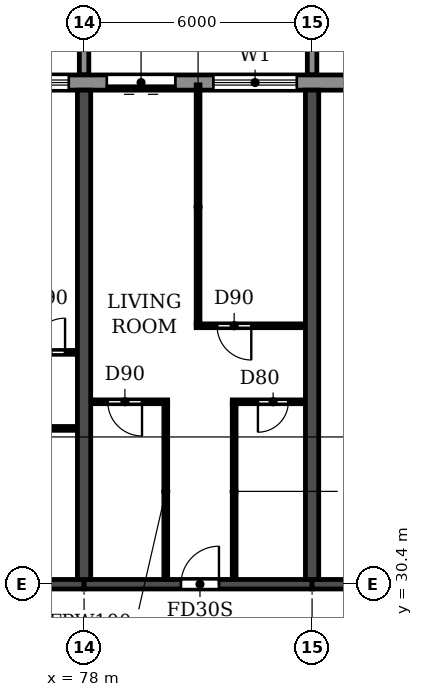
"""IFC4 building model, lengths in metres.
Left out: names, types, materials, properties, quantities, classifications, styles, units other than length and angle.
Written with IfcOpenShell. Run it as: python <this file> out.ifc"""

import sys

from ifc_helpers import new_model, si_unit, direction, frame, frame_2d, origin, place, context, subcontext, project, spatial, polyline, rectangle, outline, extrude, source, transform, mapped, element, fill, save


model = new_model("IFC4")
c1 = context("Model", 3, precision=1e-05, world=origin(), true_north=direction((0.0, 1.0)))
c2 = subcontext(c1, "Body", "Model", "MODEL_VIEW")
j1 = project(units=[si_unit("LENGTHUNIT", "METRE"), si_unit("PLANEANGLEUNIT", "RADIAN")], contexts=[c1])
p1 = place(None, origin())
s1 = spatial("IfcSite", under=j1, at=p1, CompositionType="ELEMENT")
p2 = place(p1, origin())
s2 = spatial("IfcBuilding", under=s1, at=p2, CompositionType="ELEMENT")
p3 = place(p2, frame((0.0, 0.0, 112.5)))
s3 = spatial("IfcBuildingStorey", under=s2, at=p3, CompositionType="ELEMENT", Elevation=112.5)
for number, where, z_axis, x_axis in (
    (1, (78.0, 30.525, 0.0), (0.0, 0.0, 1.0), (0.0, 1.0, 0.0)),
    (2, (84.0, 30.525, 0.0), (0.0, 0.0, 1.0), (0.0, 1.0, 0.0)),
):
    element("IfcWall", number, at=place(p3, frame(where, z_axis=z_axis, x_axis=x_axis)), inside=s3, PredefinedType="SHEAR", context=c2, shape_type="SweptSolid", body=[
        extrude(rectangle(XDim=12.875, YDim=0.35, at=frame_2d((6.438, 0.0))), origin(), (0.0, 0.0, 1.0), 2.95),
    ])
p4 = place(p3, frame((72.0, 30.4, 0.0), z_axis=(0.0, 0.0, 1.0), x_axis=(1.0, 0.0, 0.0)))
e3 = element("IfcWall", 3, at=p4, inside=s3, PredefinedType="SHEAR", context=c2, shape_type="SweptSolid", body=[
    extrude(rectangle(XDim=6.0, YDim=0.25, at=frame_2d((3.0, 0.0))), origin(), (0.0, 0.0, 1.0), 2.35),
])
p5 = place(p3, frame((78.0, 30.4, 0.0), z_axis=(0.0, 0.0, 1.0), x_axis=(1.0, 0.0, 0.0)))
e4 = element("IfcWall", 4, at=p5, inside=s3, PredefinedType="SHEAR", context=c2, shape_type="SweptSolid", body=[
    extrude(rectangle(XDim=6.0, YDim=0.25, at=frame_2d((3.0, 0.0))), origin(), (0.0, 0.0, 1.0), 2.35),
])
p6 = place(p5, frame((2.55, 0.0, 0.0)))
e5 = element("IfcOpeningElement", 5, at=p6, cuts=e4, PredefinedType="OPENING", context=c2, shape_type="SweptSolid", body=[
    extrude(rectangle(XDim=1.0, YDim=2.1, at=frame_2d((0.5, 1.05))), frame((0.0, 0.135, 0.0), z_axis=(0.0, -1.0, 0.0), x_axis=(1.0, 0.0, 0.0)), (0.0, 0.0, 1.0), 0.27),
])
p7 = place(p3, frame((84.0, 30.4, 0.0), z_axis=(0.0, 0.0, 1.0), x_axis=(1.0, 0.0, 0.0)))
e6 = element("IfcWall", 6, at=p7, inside=s3, PredefinedType="SHEAR", context=c2, shape_type="SweptSolid", body=[
    extrude(rectangle(XDim=5.8, YDim=0.25, at=frame_2d((2.9, 0.0))), origin(), (0.0, 0.0, 1.0), 2.35),
])
p8 = place(p7, frame((2.5, 0.0, 0.0)))
e7 = element("IfcOpeningElement", 7, at=p8, cuts=e6, PredefinedType="OPENING", context=c2, shape_type="SweptSolid", body=[
    extrude(rectangle(XDim=1.0, YDim=2.1, at=frame_2d((0.5, 1.05))), frame((0.0, 0.135, 0.0), z_axis=(0.0, -1.0, 0.0), x_axis=(1.0, 0.0, 0.0)), (0.0, 0.0, 1.0), 0.27),
])
p9 = place(p3, frame((85.317, 43.6, 0.0), z_axis=(0.0, 0.0, 1.0), x_axis=(-1.0, 0.0, 0.0)))
e8 = element("IfcWall", 8, at=p9, inside=s3, PredefinedType="STANDARD", context=c2, shape_type="SweptSolid", body=[
    extrude(rectangle(XDim=68.634, YDim=0.4, at=frame_2d((34.317, 0.0))), origin(), (0.0, 0.0, 1.0), 2.95),
])
p10 = place(p9, frame((64.917, 0.0, 0.0)))
e9 = element("IfcOpeningElement", 9, at=p10, cuts=e8, PredefinedType="OPENING", context=c2, shape_type="SweptSolid", body=[
    extrude(rectangle(XDim=1.8, YDim=2.4, at=frame_2d((0.9, 1.2))), frame((0.0, 0.21, 0.0), z_axis=(0.0, -1.0, 0.0), x_axis=(1.0, 0.0, 0.0)), (0.0, 0.0, 1.0), 0.42),
])
p11 = place(p9, frame((61.717, 0.0, 0.9)))
e10 = element("IfcOpeningElement", 10, at=p11, cuts=e8, PredefinedType="OPENING", context=c2, shape_type="SweptSolid", body=[
    extrude(rectangle(XDim=2.2, YDim=1.5, at=frame_2d((1.1, 0.75))), frame((0.0, 0.21, 0.0), z_axis=(0.0, -1.0, 0.0), x_axis=(1.0, 0.0, 0.0)), (0.0, 0.0, 1.0), 0.42),
])
p12 = place(p9, frame((58.717, 0.0, 0.9)))
e11 = element("IfcOpeningElement", 11, at=p12, cuts=e8, PredefinedType="OPENING", context=c2, shape_type="SweptSolid", body=[
    extrude(rectangle(XDim=2.2, YDim=1.5, at=frame_2d((1.1, 0.75))), frame((0.0, 0.21, 0.0), z_axis=(0.0, -1.0, 0.0), x_axis=(1.0, 0.0, 0.0)), (0.0, 0.0, 1.0), 0.42),
])
p13 = place(p9, frame((55.917, 0.0, 0.0)))
e12 = element("IfcOpeningElement", 12, at=p13, cuts=e8, PredefinedType="OPENING", context=c2, shape_type="SweptSolid", body=[
    extrude(rectangle(XDim=1.8, YDim=2.4, at=frame_2d((0.9, 1.2))), frame((0.0, 0.21, 0.0), z_axis=(0.0, -1.0, 0.0), x_axis=(1.0, 0.0, 0.0)), (0.0, 0.0, 1.0), 0.42),
])
p14 = place(p9, frame((52.917, 0.0, 0.0)))
e13 = element("IfcOpeningElement", 13, at=p14, cuts=e8, PredefinedType="OPENING", context=c2, shape_type="SweptSolid", body=[
    extrude(rectangle(XDim=1.8, YDim=2.4, at=frame_2d((0.9, 1.2))), frame((0.0, 0.21, 0.0), z_axis=(0.0, -1.0, 0.0), x_axis=(1.0, 0.0, 0.0)), (0.0, 0.0, 1.0), 0.42),
])
p15 = place(p9, frame((49.717, 0.0, 0.9)))
e14 = element("IfcOpeningElement", 14, at=p15, cuts=e8, PredefinedType="OPENING", context=c2, shape_type="SweptSolid", body=[
    extrude(rectangle(XDim=2.2, YDim=1.5, at=frame_2d((1.1, 0.75))), frame((0.0, 0.21, 0.0), z_axis=(0.0, -1.0, 0.0), x_axis=(1.0, 0.0, 0.0)), (0.0, 0.0, 1.0), 0.42),
])
p16 = place(p9, frame((46.717, 0.0, 0.9)))
e15 = element("IfcOpeningElement", 15, at=p16, cuts=e8, PredefinedType="OPENING", context=c2, shape_type="SweptSolid", body=[
    extrude(rectangle(XDim=2.2, YDim=1.5, at=frame_2d((1.1, 0.75))), frame((0.0, 0.21, 0.0), z_axis=(0.0, -1.0, 0.0), x_axis=(1.0, 0.0, 0.0)), (0.0, 0.0, 1.0), 0.42),
])
p17 = place(p9, frame((43.917, 0.0, 0.0)))
e16 = element("IfcOpeningElement", 16, at=p17, cuts=e8, PredefinedType="OPENING", context=c2, shape_type="SweptSolid", body=[
    extrude(rectangle(XDim=1.8, YDim=2.4, at=frame_2d((0.9, 1.2))), frame((0.0, 0.21, 0.0), z_axis=(0.0, -1.0, 0.0), x_axis=(1.0, 0.0, 0.0)), (0.0, 0.0, 1.0), 0.42),
])
p18 = place(p9, frame((40.717, 0.0, 0.9)))
e17 = element("IfcOpeningElement", 17, at=p18, cuts=e8, PredefinedType="OPENING", context=c2, shape_type="SweptSolid", body=[
    extrude(rectangle(XDim=2.2, YDim=1.5, at=frame_2d((1.1, 0.75))), frame((0.0, 0.21, 0.0), z_axis=(0.0, -1.0, 0.0), x_axis=(1.0, 0.0, 0.0)), (0.0, 0.0, 1.0), 0.42),
])
p19 = place(p9, frame((37.717, 0.0, 0.9)))
e18 = element("IfcOpeningElement", 18, at=p19, cuts=e8, PredefinedType="OPENING", context=c2, shape_type="SweptSolid", body=[
    extrude(rectangle(XDim=2.2, YDim=1.5, at=frame_2d((1.1, 0.75))), frame((0.0, 0.21, 0.0), z_axis=(0.0, -1.0, 0.0), x_axis=(1.0, 0.0, 0.0)), (0.0, 0.0, 1.0), 0.42),
])
p20 = place(p9, frame((34.917, 0.0, 0.0)))
e19 = element("IfcOpeningElement", 19, at=p20, cuts=e8, PredefinedType="OPENING", context=c2, shape_type="SweptSolid", body=[
    extrude(rectangle(XDim=1.8, YDim=2.4, at=frame_2d((0.9, 1.2))), frame((0.0, 0.21, 0.0), z_axis=(0.0, -1.0, 0.0), x_axis=(1.0, 0.0, 0.0)), (0.0, 0.0, 1.0), 0.42),
])
p21 = place(p9, frame((31.717, 0.0, 0.9)))
e20 = element("IfcOpeningElement", 20, at=p21, cuts=e8, PredefinedType="OPENING", context=c2, shape_type="SweptSolid", body=[
    extrude(rectangle(XDim=2.2, YDim=1.5, at=frame_2d((1.1, 0.75))), frame((0.0, 0.21, 0.0), z_axis=(0.0, -1.0, 0.0), x_axis=(1.0, 0.0, 0.0)), (0.0, 0.0, 1.0), 0.42),
])
p22 = place(p9, frame((28.917, 0.0, 0.0)))
e21 = element("IfcOpeningElement", 21, at=p22, cuts=e8, PredefinedType="OPENING", context=c2, shape_type="SweptSolid", body=[
    extrude(rectangle(XDim=1.8, YDim=2.4, at=frame_2d((0.9, 1.2))), frame((0.0, 0.21, 0.0), z_axis=(0.0, -1.0, 0.0), x_axis=(1.0, 0.0, 0.0)), (0.0, 0.0, 1.0), 0.42),
])
p23 = place(p9, frame((25.717, 0.0, 0.9)))
e22 = element("IfcOpeningElement", 22, at=p23, cuts=e8, PredefinedType="OPENING", context=c2, shape_type="SweptSolid", body=[
    extrude(rectangle(XDim=2.2, YDim=1.5, at=frame_2d((1.1, 0.75))), frame((0.0, 0.21, 0.0), z_axis=(0.0, -1.0, 0.0), x_axis=(1.0, 0.0, 0.0)), (0.0, 0.0, 1.0), 0.42),
])
p24 = place(p9, frame((22.717, 0.0, 0.9)))
e23 = element("IfcOpeningElement", 23, at=p24, cuts=e8, PredefinedType="OPENING", context=c2, shape_type="SweptSolid", body=[
    extrude(rectangle(XDim=2.2, YDim=1.5, at=frame_2d((1.1, 0.75))), frame((0.0, 0.21, 0.0), z_axis=(0.0, -1.0, 0.0), x_axis=(1.0, 0.0, 0.0)), (0.0, 0.0, 1.0), 0.42),
])
p25 = place(p9, frame((19.917, 0.0, 0.0)))
e24 = element("IfcOpeningElement", 24, at=p25, cuts=e8, PredefinedType="OPENING", context=c2, shape_type="SweptSolid", body=[
    extrude(rectangle(XDim=1.8, YDim=2.4, at=frame_2d((0.9, 1.2))), frame((0.0, 0.21, 0.0), z_axis=(0.0, -1.0, 0.0), x_axis=(1.0, 0.0, 0.0)), (0.0, 0.0, 1.0), 0.42),
])
p26 = place(p9, frame((16.717, 0.0, 0.9)))
e25 = element("IfcOpeningElement", 25, at=p26, cuts=e8, PredefinedType="OPENING", context=c2, shape_type="SweptSolid", body=[
    extrude(rectangle(XDim=2.2, YDim=1.5, at=frame_2d((1.1, 0.75))), frame((0.0, 0.21, 0.0), z_axis=(0.0, -1.0, 0.0), x_axis=(1.0, 0.0, 0.0)), (0.0, 0.0, 1.0), 0.42),
])
p27 = place(p9, frame((13.917, 0.0, 0.0)))
e26 = element("IfcOpeningElement", 26, at=p27, cuts=e8, PredefinedType="OPENING", context=c2, shape_type="SweptSolid", body=[
    extrude(rectangle(XDim=1.8, YDim=2.4, at=frame_2d((0.9, 1.2))), frame((0.0, 0.21, 0.0), z_axis=(0.0, -1.0, 0.0), x_axis=(1.0, 0.0, 0.0)), (0.0, 0.0, 1.0), 0.42),
])
p28 = place(p9, frame((10.717, 0.0, 0.9)))
e27 = element("IfcOpeningElement", 27, at=p28, cuts=e8, PredefinedType="OPENING", context=c2, shape_type="SweptSolid", body=[
    extrude(rectangle(XDim=2.2, YDim=1.5, at=frame_2d((1.1, 0.75))), frame((0.0, 0.21, 0.0), z_axis=(0.0, -1.0, 0.0), x_axis=(1.0, 0.0, 0.0)), (0.0, 0.0, 1.0), 0.42),
])
p29 = place(p9, frame((7.717, 0.0, 0.9)))
e28 = element("IfcOpeningElement", 28, at=p29, cuts=e8, PredefinedType="OPENING", context=c2, shape_type="SweptSolid", body=[
    extrude(rectangle(XDim=2.2, YDim=1.5, at=frame_2d((1.1, 0.75))), frame((0.0, 0.21, 0.0), z_axis=(0.0, -1.0, 0.0), x_axis=(1.0, 0.0, 0.0)), (0.0, 0.0, 1.0), 0.42),
])
p30 = place(p9, frame((4.917, 0.0, 0.0)))
e29 = element("IfcOpeningElement", 29, at=p30, cuts=e8, PredefinedType="OPENING", context=c2, shape_type="SweptSolid", body=[
    extrude(rectangle(XDim=1.8, YDim=2.4, at=frame_2d((0.9, 1.2))), frame((0.0, 0.21, 0.0), z_axis=(0.0, -1.0, 0.0), x_axis=(1.0, 0.0, 0.0)), (0.0, 0.0, 1.0), 0.42),
])
p31 = place(p9, frame((1.717, 0.0, 0.9)))
e30 = element("IfcOpeningElement", 30, at=p31, cuts=e8, PredefinedType="OPENING", context=c2, shape_type="SweptSolid", body=[
    extrude(rectangle(XDim=2.2, YDim=1.5, at=frame_2d((1.1, 0.75))), frame((0.0, 0.21, 0.0), z_axis=(0.0, -1.0, 0.0), x_axis=(1.0, 0.0, 0.0)), (0.0, 0.0, 1.0), 0.42),
])
m1 = source(origin(), c2, "Body", "SweptSolid", [
    extrude(outline(polyline([(0.0, 0.0), (0.25, 0.0), (0.25, 3.1), (0.0, 3.1), (0.0, 0.0)])), origin(), (0.0, 0.0, 1.0), 3.1),
])
for number, where in (
    (31, (77.875, 43.8, 0.0)),
    (32, (83.875, 43.8, 0.0)),
):
    element("IfcWall", number, at=place(p3, frame(where)), inside=s3, PredefinedType="STANDARD", context=c2, shape_type="MappedRepresentation", body=[
        mapped(m1, transform((0.0, 0.0, 0.0))),
    ])
p32 = place(p3, frame((72.185, 34.5, 0.0), z_axis=(0.0, 0.0, 1.0), x_axis=(1.0, 0.0, 0.0)))
e33 = element("IfcWall", 33, at=p32, inside=s3, PredefinedType="PARTITIONING", context=c2, shape_type="SweptSolid", body=[
    extrude(rectangle(XDim=5.63, YDim=0.1, at=frame_2d((2.815, 0.0))), origin(), (0.0, 0.0, 1.0), 2.95),
])
p33 = place(p32, frame((1.065, 0.0, 0.0)))
e34 = element("IfcOpeningElement", 34, at=p33, cuts=e33, PredefinedType="OPENING", context=c2, shape_type="SweptSolid", body=[
    extrude(rectangle(XDim=0.8, YDim=2.1, at=frame_2d((0.4, 1.05))), frame((0.0, 0.06, 0.0), z_axis=(0.0, -1.0, 0.0), x_axis=(1.0, 0.0, 0.0)), (0.0, 0.0, 1.0), 0.12),
])
p34 = place(p32, frame((4.065, 0.0, 0.0)))
e35 = element("IfcOpeningElement", 35, at=p34, cuts=e33, PredefinedType="OPENING", context=c2, shape_type="SweptSolid", body=[
    extrude(rectangle(XDim=0.8, YDim=2.1, at=frame_2d((0.4, 1.05))), frame((0.0, 0.06, 0.0), z_axis=(0.0, -1.0, 0.0), x_axis=(1.0, 0.0, 0.0)), (0.0, 0.0, 1.0), 0.12),
])
p35 = place(p3, frame((78.185, 35.2, 0.0), z_axis=(0.0, 0.0, 1.0), x_axis=(1.0, 0.0, 0.0)))
e36 = element("IfcWall", 36, at=p35, inside=s3, PredefinedType="PARTITIONING", context=c2, shape_type="SweptSolid", body=[
    extrude(rectangle(XDim=2.015, YDim=0.1, at=frame_2d((1.007, 0.0))), origin(), (0.0, 0.0, 1.0), 2.95),
])
p36 = place(p35, frame((0.44, 0.0, 0.0)))
e37 = element("IfcOpeningElement", 37, at=p36, cuts=e36, PredefinedType="OPENING", context=c2, shape_type="SweptSolid", body=[
    extrude(rectangle(XDim=0.9, YDim=2.1, at=frame_2d((0.45, 1.05))), frame((0.0, 0.06, 0.0), z_axis=(0.0, -1.0, 0.0), x_axis=(1.0, 0.0, 0.0)), (0.0, 0.0, 1.0), 0.12),
])
p37 = place(p3, frame((81.9, 35.2, 0.0), z_axis=(0.0, 0.0, 1.0), x_axis=(1.0, 0.0, 0.0)))
e38 = element("IfcWall", 38, at=p37, inside=s3, PredefinedType="PARTITIONING", context=c2, shape_type="SweptSolid", body=[
    extrude(rectangle(XDim=1.915, YDim=0.1, at=frame_2d((0.958, 0.0))), origin(), (0.0, 0.0, 1.0), 2.95),
])
p38 = place(p37, frame((0.675, 0.0, 0.0)))
e39 = element("IfcOpeningElement", 39, at=p38, cuts=e38, PredefinedType="OPENING", context=c2, shape_type="SweptSolid", body=[
    extrude(rectangle(XDim=0.8, YDim=2.1, at=frame_2d((0.4, 1.05))), frame((0.0, 0.06, 0.0), z_axis=(0.0, -1.0, 0.0), x_axis=(1.0, 0.0, 0.0)), (0.0, 0.0, 1.0), 0.12),
])
p39 = place(p3, frame((72.185, 36.5, 0.0), z_axis=(0.0, 0.0, 1.0), x_axis=(1.0, 0.0, 0.0)))
e40 = element("IfcWall", 40, at=p39, inside=s3, PredefinedType="PARTITIONING", context=c2, shape_type="SweptSolid", body=[
    extrude(rectangle(XDim=5.63, YDim=0.1, at=frame_2d((2.815, 0.0))), origin(), (0.0, 0.0, 1.0), 2.95),
])
p40 = place(p39, frame((0.315, 0.0, 0.0)))
e41 = element("IfcOpeningElement", 41, at=p40, cuts=e40, PredefinedType="OPENING", context=c2, shape_type="SweptSolid", body=[
    extrude(rectangle(XDim=0.9, YDim=2.1, at=frame_2d((0.45, 1.05))), frame((0.0, 0.06, 0.0), z_axis=(0.0, -1.0, 0.0), x_axis=(1.0, 0.0, 0.0)), (0.0, 0.0, 1.0), 0.12),
])
p41 = place(p39, frame((4.415, 0.0, 0.0)))
e42 = element("IfcOpeningElement", 42, at=p41, cuts=e40, PredefinedType="OPENING", context=c2, shape_type="SweptSolid", body=[
    extrude(rectangle(XDim=0.9, YDim=2.1, at=frame_2d((0.45, 1.05))), frame((0.0, 0.06, 0.0), z_axis=(0.0, -1.0, 0.0), x_axis=(1.0, 0.0, 0.0)), (0.0, 0.0, 1.0), 0.12),
])
p42 = place(p3, frame((80.95, 37.2, 0.0), z_axis=(0.0, 0.0, 1.0), x_axis=(1.0, 0.0, 0.0)))
e43 = element("IfcWall", 43, at=p42, inside=s3, PredefinedType="PARTITIONING", context=c2, shape_type="SweptSolid", body=[
    extrude(rectangle(XDim=2.865, YDim=0.1, at=frame_2d((1.433, 0.0))), origin(), (0.0, 0.0, 1.0), 2.95),
])
p43 = place(p42, frame((0.55, 0.0, 0.0)))
e44 = element("IfcOpeningElement", 44, at=p43, cuts=e43, PredefinedType="OPENING", context=c2, shape_type="SweptSolid", body=[
    extrude(rectangle(XDim=0.9, YDim=2.1, at=frame_2d((0.45, 1.05))), frame((0.0, 0.06, 0.0), z_axis=(0.0, -1.0, 0.0), x_axis=(1.0, 0.0, 0.0)), (0.0, 0.0, 1.0), 0.12),
])
p44 = place(p3, frame((80.15, 30.535, 0.0), z_axis=(0.0, 0.0, 1.0), x_axis=(0.0, 1.0, 0.0)))
e45 = element("IfcWall", 45, at=p44, inside=s3, PredefinedType="PARTITIONING", context=c2, shape_type="SweptSolid", body=[
    extrude(rectangle(XDim=4.615, YDim=0.1, at=frame_2d((2.308, 0.0))), origin(), (0.0, 0.0, 1.0), 2.95),
])
p45 = place(p3, frame((81.0, 37.25, 0.0), z_axis=(0.0, 0.0, 1.0), x_axis=(0.0, 1.0, 0.0)))
e46 = element("IfcWall", 46, at=p45, inside=s3, PredefinedType="PARTITIONING", context=c2, shape_type="SweptSolid", body=[
    extrude(rectangle(XDim=6.29, YDim=0.1, at=frame_2d((3.145, 0.0))), origin(), (0.0, 0.0, 1.0), 2.95),
])
p46 = place(p3, frame((81.95, 30.535, 0.0), z_axis=(0.0, 0.0, 1.0), x_axis=(0.0, 1.0, 0.0)))
e47 = element("IfcWall", 47, at=p46, inside=s3, PredefinedType="PARTITIONING", context=c2, shape_type="SweptSolid", body=[
    extrude(rectangle(XDim=4.615, YDim=0.1, at=frame_2d((2.308, 0.0))), origin(), (0.0, 0.0, 1.0), 2.95),
])
p47 = place(p29, origin())
e48 = element("IfcWindow", 48, at=p47, inside=s3, PartitioningType="DOUBLE_PANEL_HORIZONTAL", PredefinedType="WINDOW", context=c2, shape_type="SweptSolid", body=[
    extrude(rectangle(XDim=2.2, YDim=1.5, at=frame_2d((1.1, 0.75))), frame((0.0, 0.03, 0.0), z_axis=(0.0, -1.0, 0.0), x_axis=(1.0, 0.0, 0.0)), (0.0, 0.0, 1.0), 0.06),
])
fill(e28, e48)
p48 = place(p30, origin())
e49 = element("IfcDoor", 49, at=p48, inside=s3, OperationType="DOUBLE_DOOR_SLIDING", PredefinedType="DOOR", context=c2, shape_type="SweptSolid", body=[
    extrude(rectangle(XDim=1.8, YDim=2.4, at=frame_2d((0.9, 1.2))), frame((0.0, 0.025, 0.0), z_axis=(0.0, -1.0, 0.0), x_axis=(1.0, 0.0, 0.0)), (0.0, 0.0, 1.0), 0.05),
])
fill(e29, e49)
p49 = place(p31, origin())
e50 = element("IfcWindow", 50, at=p49, inside=s3, PartitioningType="DOUBLE_PANEL_HORIZONTAL", PredefinedType="WINDOW", context=c2, shape_type="SweptSolid", body=[
    extrude(rectangle(XDim=2.2, YDim=1.5, at=frame_2d((1.1, 0.75))), frame((0.0, 0.03, 0.0), z_axis=(0.0, -1.0, 0.0), x_axis=(1.0, 0.0, 0.0)), (0.0, 0.0, 1.0), 0.06),
])
fill(e30, e50)
p50 = place(p41, origin())
e51 = element("IfcDoor", 51, at=p50, inside=s3, OperationType="SINGLE_SWING_RIGHT", PredefinedType="DOOR", context=c2, shape_type="SweptSolid", body=[
    extrude(rectangle(XDim=0.9, YDim=2.1, at=frame_2d((0.45, 1.05))), frame((0.0, 0.025, 0.0), z_axis=(0.0, -1.0, 0.0), x_axis=(1.0, 0.0, 0.0)), (0.0, 0.0, 1.0), 0.05),
])
fill(e42, e51)
p51 = place(p36, frame((0.9, 0.0, 0.0), z_axis=(0.0, 0.0, 1.0), x_axis=(-1.0, 0.0, 0.0)))
e52 = element("IfcDoor", 52, at=p51, inside=s3, OperationType="SINGLE_SWING_LEFT", PredefinedType="DOOR", context=c2, shape_type="SweptSolid", body=[
    extrude(rectangle(XDim=0.9, YDim=2.1, at=frame_2d((0.45, 1.05))), frame((0.0, 0.025, 0.0), z_axis=(0.0, -1.0, 0.0), x_axis=(1.0, 0.0, 0.0)), (0.0, 0.0, 1.0), 0.05),
])
fill(e37, e52)
p52 = place(p6, origin())
e53 = element("IfcDoor", 53, at=p52, inside=s3, OperationType="SINGLE_SWING_RIGHT", PredefinedType="DOOR", context=c2, shape_type="SweptSolid", body=[
    extrude(rectangle(XDim=1.0, YDim=2.1, at=frame_2d((0.5, 1.05))), frame((0.0, 0.025, 0.0), z_axis=(0.0, -1.0, 0.0), x_axis=(1.0, 0.0, 0.0)), (0.0, 0.0, 1.0), 0.05),
])
fill(e5, e53)
p53 = place(p43, frame((0.9, 0.0, 0.0), z_axis=(0.0, 0.0, 1.0), x_axis=(-1.0, 0.0, 0.0)))
e54 = element("IfcDoor", 54, at=p53, inside=s3, OperationType="SINGLE_SWING_LEFT", PredefinedType="DOOR", context=c2, shape_type="SweptSolid", body=[
    extrude(rectangle(XDim=0.9, YDim=2.1, at=frame_2d((0.45, 1.05))), frame((0.0, 0.025, 0.0), z_axis=(0.0, -1.0, 0.0), x_axis=(1.0, 0.0, 0.0)), (0.0, 0.0, 1.0), 0.05),
])
fill(e44, e54)
p54 = place(p38, frame((0.8, 0.0, 0.0), z_axis=(0.0, 0.0, 1.0), x_axis=(-1.0, 0.0, 0.0)))
e55 = element("IfcDoor", 55, at=p54, inside=s3, OperationType="SINGLE_SWING_RIGHT", PredefinedType="DOOR", context=c2, shape_type="SweptSolid", body=[
    extrude(rectangle(XDim=0.8, YDim=2.1, at=frame_2d((0.4, 1.05))), frame((0.0, 0.025, 0.0), z_axis=(0.0, -1.0, 0.0), x_axis=(1.0, 0.0, 0.0)), (0.0, 0.0, 1.0), 0.05),
])
fill(e39, e55)
save(model, sys.argv[1])
